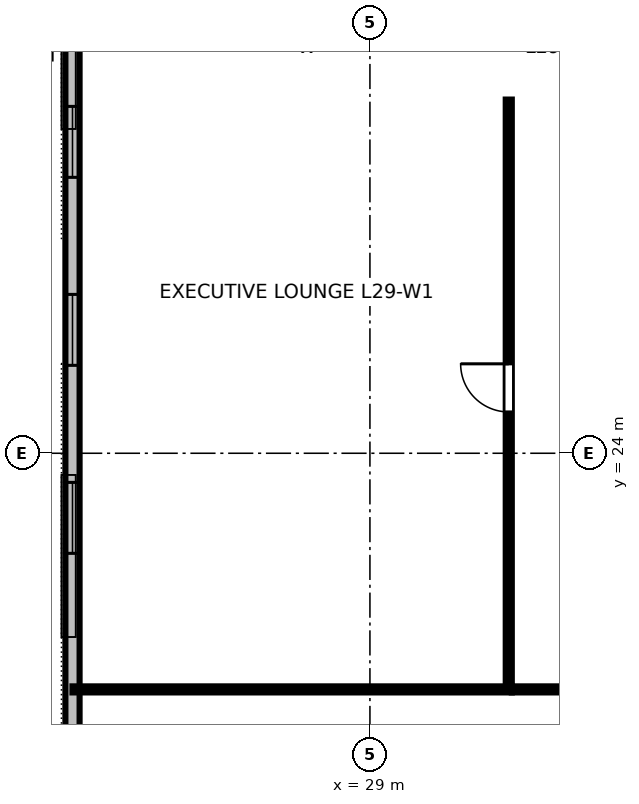
"""IFC4 building model, lengths in metres.
Left out: names, types, materials, properties, quantities, classifications, styles, units other than length and angle.
Written with IfcOpenShell. Run it as: python <this file> out.ifc"""

import sys

from ifc_helpers import new_model, si_unit, direction, frame, frame_2d, origin, origin_2d, place, context, subcontext, project, spatial, rectangle, i_section, extrude, element, fill, save


model = new_model("IFC4")
c1 = context("Model", 3, precision=1e-05, world=origin(), true_north=direction((0.0, 1.0)))
c2 = subcontext(c1, "Body", "Model", "MODEL_VIEW")
j1 = project(units=[si_unit("LENGTHUNIT", "METRE"), si_unit("PLANEANGLEUNIT", "RADIAN")], contexts=[c1])
p1 = place(None, origin())
s1 = spatial("IfcSite", under=j1, at=p1, CompositionType="ELEMENT")
p2 = place(p1, origin())
s2 = spatial("IfcBuilding", under=s1, at=p2, CompositionType="ELEMENT")
p3 = place(p2, frame((0.0, 0.0, 113.2)))
s3 = spatial("IfcBuildingStorey", under=s2, at=p3, CompositionType="ELEMENT", Elevation=113.2)
p4 = place(p3, frame((22.47, 32.0, 0.0), z_axis=(0.19007295017, 0.0, 0.981769969806), x_axis=(-0.981769969806, 0.0, 0.19007295017)))
e1 = element("IfcColumn", 1, at=p4, inside=s3, PredefinedType="COLUMN", context=c2, shape_type="SweptSolid", body=[
    extrude(i_section(OverallWidth=0.418, OverallDepth=0.455, WebThickness=0.042, FlangeThickness=0.068, FilletRadius=0.025, at=origin_2d()), origin(), (0.0, 0.0, 1.0), 3.42),
])
p5 = place(p3, frame((23.13, 47.94, 0.0), z_axis=(0.0, 0.0, 1.0), x_axis=(0.0, -1.0, 0.0)))
e2 = element("IfcWall", 2, at=p5, inside=s3, PredefinedType="STANDARD", context=c2, shape_type="SweptSolid", body=[
    extrude(rectangle(XDim=31.88, YDim=0.28, at=frame_2d((15.94, 0.0))), origin(), (0.0, 0.0, 1.0), 2.662),
])
p6 = place(p5, frame((5.965, 0.0, 0.85)))
e3 = element("IfcOpeningElement", 3, at=p6, cuts=e2, PredefinedType="OPENING", context=c2, shape_type="SweptSolid", body=[
    extrude(rectangle(XDim=1.4, YDim=1.2, at=frame_2d((0.7, 0.6))), frame((0.0, 0.15, 0.0), z_axis=(0.0, -1.0, 0.0), x_axis=(1.0, 0.0, 0.0)), (0.0, 0.0, 1.0), 0.3),
])
p7 = place(p5, frame((9.675, 0.0, 0.85)))
e4 = element("IfcOpeningElement", 4, at=p7, cuts=e2, PredefinedType="OPENING", context=c2, shape_type="SweptSolid", body=[
    extrude(rectangle(XDim=1.4, YDim=1.2, at=frame_2d((0.7, 0.6))), frame((0.0, 0.15, 0.0), z_axis=(0.0, -1.0, 0.0), x_axis=(1.0, 0.0, 0.0)), (0.0, 0.0, 1.0), 0.3),
])
p8 = place(p5, frame((13.385, 0.0, 0.85)))
e5 = element("IfcOpeningElement", 5, at=p8, cuts=e2, PredefinedType="OPENING", context=c2, shape_type="SweptSolid", body=[
    extrude(rectangle(XDim=1.4, YDim=1.2, at=frame_2d((0.7, 0.6))), frame((0.0, 0.15, 0.0), z_axis=(0.0, -1.0, 0.0), x_axis=(1.0, 0.0, 0.0)), (0.0, 0.0, 1.0), 0.3),
])
p9 = place(p5, frame((17.095, 0.0, 0.85)))
e6 = element("IfcOpeningElement", 6, at=p9, cuts=e2, PredefinedType="OPENING", context=c2, shape_type="SweptSolid", body=[
    extrude(rectangle(XDim=1.4, YDim=1.2, at=frame_2d((0.7, 0.6))), frame((0.0, 0.15, 0.0), z_axis=(0.0, -1.0, 0.0), x_axis=(1.0, 0.0, 0.0)), (0.0, 0.0, 1.0), 0.3),
])
p10 = place(p5, frame((20.805, 0.0, 0.85)))
e7 = element("IfcOpeningElement", 7, at=p10, cuts=e2, PredefinedType="OPENING", context=c2, shape_type="SweptSolid", body=[
    extrude(rectangle(XDim=1.4, YDim=1.2, at=frame_2d((0.7, 0.6))), frame((0.0, 0.15, 0.0), z_axis=(0.0, -1.0, 0.0), x_axis=(1.0, 0.0, 0.0)), (0.0, 0.0, 1.0), 0.3),
])
p11 = place(p5, frame((24.515, 0.0, 0.85)))
e8 = element("IfcOpeningElement", 8, at=p11, cuts=e2, PredefinedType="OPENING", context=c2, shape_type="SweptSolid", body=[
    extrude(rectangle(XDim=1.4, YDim=1.2, at=frame_2d((0.7, 0.6))), frame((0.0, 0.15, 0.0), z_axis=(0.0, -1.0, 0.0), x_axis=(1.0, 0.0, 0.0)), (0.0, 0.0, 1.0), 0.3),
])
p12 = place(p3, frame((31.8, 19.34, 0.0), z_axis=(0.0, 0.0, 1.0), x_axis=(1.0, 0.0, 0.0)))
e9 = element("IfcWall", 9, at=p12, inside=s3, PredefinedType="PARTITIONING", context=c2, shape_type="SweptSolid", body=[
    extrude(rectangle(XDim=28.4, YDim=0.12, at=frame_2d((14.2, 0.0))), origin(), (0.0, 0.0, 1.0), 2.64),
])
p13 = place(p12, frame((3.152, 0.0, 0.0)))
e10 = element("IfcOpeningElement", 10, at=p13, cuts=e9, PredefinedType="OPENING", context=c2, shape_type="SweptSolid", body=[
    extrude(rectangle(XDim=0.95, YDim=2.15, at=frame_2d((0.475, 1.075))), frame((0.0, 0.07, 0.0), z_axis=(0.0, -1.0, 0.0), x_axis=(1.0, 0.0, 0.0)), (0.0, 0.0, 1.0), 0.14),
])
p14 = place(p12, frame((10.136, 0.0, 0.0)))
e11 = element("IfcOpeningElement", 11, at=p14, cuts=e9, PredefinedType="OPENING", context=c2, shape_type="SweptSolid", body=[
    extrude(rectangle(XDim=0.95, YDim=2.15, at=frame_2d((0.475, 1.075))), frame((0.0, 0.07, 0.0), z_axis=(0.0, -1.0, 0.0), x_axis=(1.0, 0.0, 0.0)), (0.0, 0.0, 1.0), 0.14),
])
p15 = place(p12, frame((15.813, 0.0, 0.0)))
e12 = element("IfcOpeningElement", 12, at=p15, cuts=e9, PredefinedType="OPENING", context=c2, shape_type="SweptSolid", body=[
    extrude(rectangle(XDim=0.95, YDim=2.15, at=frame_2d((0.475, 1.075))), frame((0.0, 0.07, 0.0), z_axis=(0.0, -1.0, 0.0), x_axis=(1.0, 0.0, 0.0)), (0.0, 0.0, 1.0), 0.14),
])
p16 = place(p12, frame((22.888, 0.0, 0.0)))
e13 = element("IfcOpeningElement", 13, at=p16, cuts=e9, PredefinedType="OPENING", context=c2, shape_type="SweptSolid", body=[
    extrude(rectangle(XDim=0.95, YDim=2.15, at=frame_2d((0.475, 1.075))), frame((0.0, 0.07, 0.0), z_axis=(0.0, -1.0, 0.0), x_axis=(1.0, 0.0, 0.0)), (0.0, 0.0, 1.0), 0.14),
])
p17 = place(p3, frame((31.74, 19.4, 0.0), z_axis=(0.0, 0.0, 1.0), x_axis=(0.0, 1.0, 0.0)))
e14 = element("IfcWall", 14, at=p17, inside=s3, PredefinedType="PARTITIONING", context=c2, shape_type="SweptSolid", body=[
    extrude(rectangle(XDim=11.58, YDim=0.12, at=frame_2d((5.79, 0.0))), origin(), (0.0, 0.0, 1.0), 2.64),
])
p18 = place(p17, frame((5.415, 0.0, 0.0)))
e15 = element("IfcOpeningElement", 15, at=p18, cuts=e14, PredefinedType="OPENING", context=c2, shape_type="SweptSolid", body=[
    extrude(rectangle(XDim=0.95, YDim=2.15, at=frame_2d((0.475, 1.075))), frame((0.0, 0.07, 0.0), z_axis=(0.0, -1.0, 0.0), x_axis=(1.0, 0.0, 0.0)), (0.0, 0.0, 1.0), 0.14),
])
p19 = place(p3, frame((31.8, 19.34, 0.0), z_axis=(0.0, 0.0, 1.0), x_axis=(-1.0, 0.0, 0.0)))
e16 = element("IfcWall", 16, at=p19, inside=s3, PredefinedType="PARTITIONING", context=c2, shape_type="SweptSolid", body=[
    extrude(rectangle(XDim=8.67, YDim=0.12, at=frame_2d((4.335, 0.0))), origin(), (0.0, 0.0, 1.0), 2.64),
])
p20 = place(p9, origin())
e17 = element("IfcWindow", 17, at=p20, inside=s3, PartitioningType="SINGLE_PANEL", PredefinedType="WINDOW", context=c2, shape_type="SweptSolid", body=[
    extrude(rectangle(XDim=1.4, YDim=1.2, at=frame_2d((0.7, 0.6))), frame((0.0, 0.03, 0.0), z_axis=(0.0, -1.0, 0.0), x_axis=(1.0, 0.0, 0.0)), (0.0, 0.0, 1.0), 0.06),
])
fill(e6, e17)
p21 = place(p10, origin())
e18 = element("IfcWindow", 18, at=p21, inside=s3, PartitioningType="SINGLE_PANEL", PredefinedType="WINDOW", context=c2, shape_type="SweptSolid", body=[
    extrude(rectangle(XDim=1.4, YDim=1.2, at=frame_2d((0.7, 0.6))), frame((0.0, 0.03, 0.0), z_axis=(0.0, -1.0, 0.0), x_axis=(1.0, 0.0, 0.0)), (0.0, 0.0, 1.0), 0.06),
])
fill(e7, e18)
p22 = place(p11, origin())
e19 = element("IfcWindow", 19, at=p22, inside=s3, PartitioningType="SINGLE_PANEL", PredefinedType="WINDOW", context=c2, shape_type="SweptSolid", body=[
    extrude(rectangle(XDim=1.4, YDim=1.2, at=frame_2d((0.7, 0.6))), frame((0.0, 0.03, 0.0), z_axis=(0.0, -1.0, 0.0), x_axis=(1.0, 0.0, 0.0)), (0.0, 0.0, 1.0), 0.06),
])
fill(e8, e19)
p23 = place(p18, origin())
e20 = element("IfcDoor", 20, at=p23, inside=s3, OperationType="SINGLE_SWING_RIGHT", PredefinedType="DOOR", context=c2, shape_type="SweptSolid", body=[
    extrude(rectangle(XDim=0.95, YDim=2.15, at=frame_2d((0.475, 1.075))), frame((0.0, 0.025, 0.0), z_axis=(0.0, -1.0, 0.0), x_axis=(1.0, 0.0, 0.0)), (0.0, 0.0, 1.0), 0.05),
])
fill(e15, e20)
save(model, sys.argv[1])
